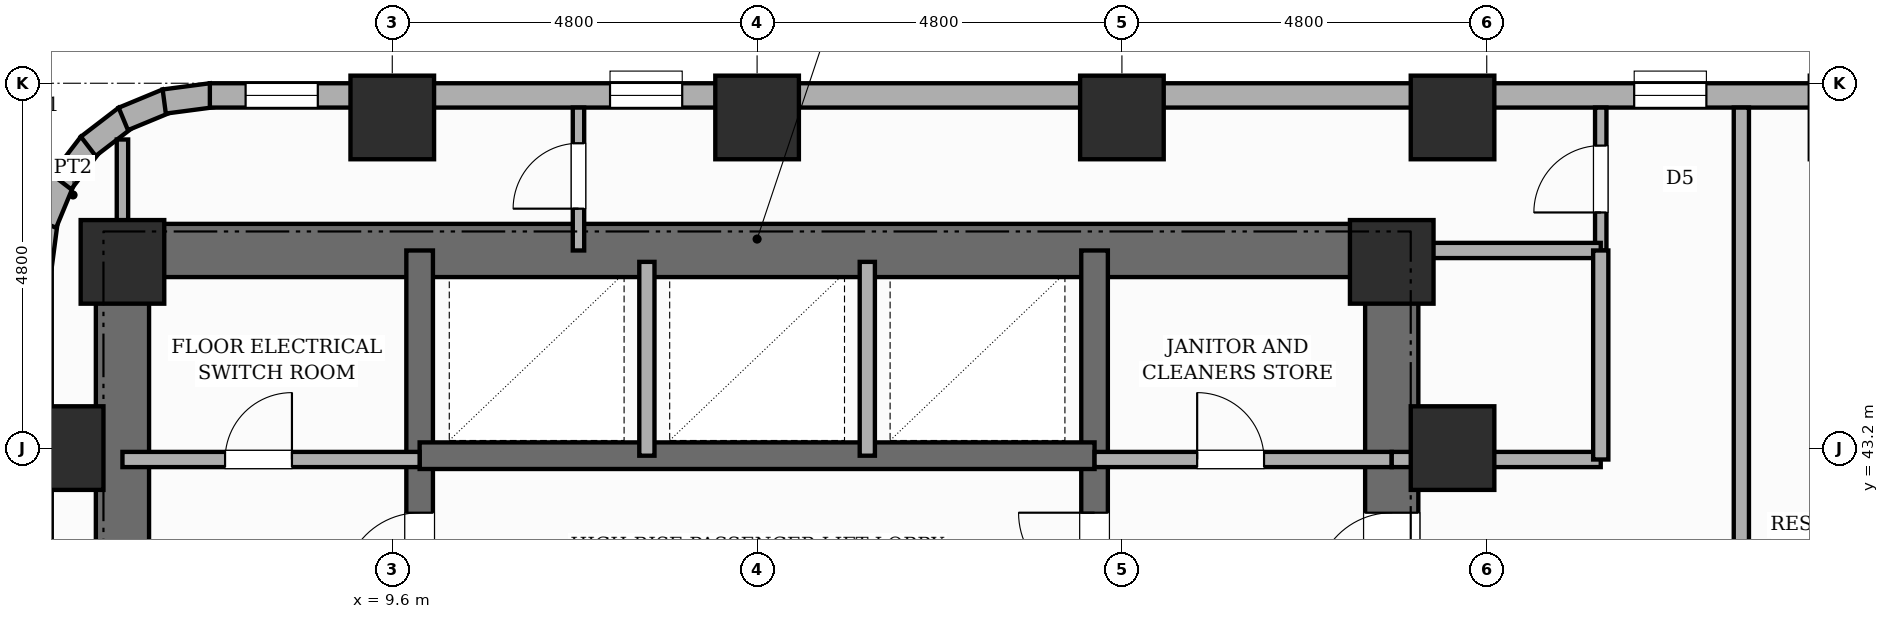
"""IFC4 building model, lengths in metres.
Left out: names, types, materials, properties, quantities, classifications, styles, units other than length and angle.
Written with IfcOpenShell. Run it as: python <this file> out.ifc"""

import sys

from ifc_helpers import new_model, si_unit, direction, frame, frame_2d, origin, origin_2d, place, context, subcontext, project, spatial, rectangle, extrude, element, fill, save


model = new_model("IFC4")
c1 = context("Model", 3, precision=1e-05, world=origin(), true_north=direction((0.0, 1.0)))
c2 = subcontext(c1, "Body", "Model", "MODEL_VIEW")
j1 = project(units=[si_unit("LENGTHUNIT", "METRE"), si_unit("PLANEANGLEUNIT", "RADIAN")], contexts=[c1])
p1 = place(None, origin())
s1 = spatial("IfcSite", under=j1, at=p1, CompositionType="ELEMENT")
p2 = place(p1, origin())
s2 = spatial("IfcBuilding", under=s1, at=p2, CompositionType="ELEMENT")
p3 = place(p2, frame((0.0, 0.0, 35.8)))
s3 = spatial("IfcBuildingStorey", under=s2, at=p3, CompositionType="ELEMENT", Elevation=35.8)
p4 = place(p3, frame((6.05, 30.55, 0.0), z_axis=(0.0, 0.0, 1.0), x_axis=(0.0, 1.0, 0.0)))
e1 = element("IfcWall", 1, at=p4, inside=s3, PredefinedType="SHEAR", context=c2, shape_type="SweptSolid", body=[
    extrude(rectangle(XDim=15.6, YDim=0.7, at=frame_2d((7.8, 0.0))), origin(), (0.0, 0.0, 1.0), 3.6),
])
p5 = place(p3, frame((22.75, 30.55, 0.0), z_axis=(0.0, 0.0, 1.0), x_axis=(0.0, 1.0, 0.0)))
e2 = element("IfcWall", 2, at=p5, inside=s3, PredefinedType="SHEAR", context=c2, shape_type="SweptSolid", body=[
    extrude(rectangle(XDim=15.6, YDim=0.7, at=frame_2d((7.8, 0.0))), origin(), (0.0, 0.0, 1.0), 3.6),
])
p6 = place(p5, frame((10.8, 0.0, 0.0)))
e3 = element("IfcOpeningElement", 3, at=p6, cuts=e2, PredefinedType="OPENING", context=c2, shape_type="SweptSolid", body=[
    extrude(rectangle(XDim=1.0, YDim=2.15, at=frame_2d((0.5, 1.075))), frame((0.0, 0.36, 0.0), z_axis=(0.0, -1.0, 0.0), x_axis=(1.0, 0.0, 0.0)), (0.0, 0.0, 1.0), 0.72),
])
p7 = place(p3, frame((6.05, 45.8, 0.0), z_axis=(0.0, 0.0, 1.0), x_axis=(1.0, 0.0, 0.0)))
e4 = element("IfcWall", 4, at=p7, inside=s3, PredefinedType="SHEAR", context=c2, shape_type="SweptSolid", body=[
    extrude(rectangle(XDim=16.7, YDim=0.7, at=frame_2d((8.35, 0.0))), origin(), (0.0, 0.0, 1.0), 3.6),
])
p8 = place(p3, frame((9.96, 30.9, 0.0), z_axis=(0.0, 0.0, 1.0), x_axis=(0.0, 1.0, 0.0)))
e5 = element("IfcWall", 5, at=p8, inside=s3, PredefinedType="SHEAR", context=c2, shape_type="SweptSolid", body=[
    extrude(rectangle(XDim=14.9, YDim=0.35, at=frame_2d((7.45, 0.0))), origin(), (0.0, 0.0, 1.0), 3.6),
])
p9 = place(p8, frame((0.65, 0.0, 0.0)))
e6 = element("IfcOpeningElement", 6, at=p9, cuts=e5, PredefinedType="OPENING", context=c2, shape_type="SweptSolid", body=[
    extrude(rectangle(XDim=0.95, YDim=2.1, at=frame_2d((0.475, 1.05))), frame((0.0, 0.185, 0.0), z_axis=(0.0, -1.0, 0.0), x_axis=(1.0, 0.0, 0.0)), (0.0, 0.0, 1.0), 0.37),
])
p10 = place(p8, frame((10.45, 0.0, 0.0)))
e7 = element("IfcOpeningElement", 7, at=p10, cuts=e5, PredefinedType="OPENING", context=c2, shape_type="SweptSolid", body=[
    extrude(rectangle(XDim=1.0, YDim=2.15, at=frame_2d((0.5, 1.075))), frame((0.0, 0.185, 0.0), z_axis=(0.0, -1.0, 0.0), x_axis=(1.0, 0.0, 0.0)), (0.0, 0.0, 1.0), 0.37),
])
p11 = place(p3, frame((18.84, 30.9, 0.0), z_axis=(0.0, 0.0, 1.0), x_axis=(0.0, 1.0, 0.0)))
e8 = element("IfcWall", 8, at=p11, inside=s3, PredefinedType="SHEAR", context=c2, shape_type="SweptSolid", body=[
    extrude(rectangle(XDim=14.9, YDim=0.35, at=frame_2d((7.45, 0.0))), origin(), (0.0, 0.0, 1.0), 3.6),
])
p12 = place(p11, frame((0.65, 0.0, 0.0)))
e9 = element("IfcOpeningElement", 9, at=p12, cuts=e8, PredefinedType="OPENING", context=c2, shape_type="SweptSolid", body=[
    extrude(rectangle(XDim=0.95, YDim=2.1, at=frame_2d((0.475, 1.05))), frame((0.0, 0.185, 0.0), z_axis=(0.0, -1.0, 0.0), x_axis=(1.0, 0.0, 0.0)), (0.0, 0.0, 1.0), 0.37),
])
p13 = place(p11, frame((10.45, 0.0, 0.0)))
e10 = element("IfcOpeningElement", 10, at=p13, cuts=e8, PredefinedType="OPENING", context=c2, shape_type="SweptSolid", body=[
    extrude(rectangle(XDim=1.0, YDim=2.15, at=frame_2d((0.5, 1.075))), frame((0.0, 0.185, 0.0), z_axis=(0.0, -1.0, 0.0), x_axis=(1.0, 0.0, 0.0)), (0.0, 0.0, 1.0), 0.37),
])
p14 = place(p3, frame((9.96, 43.1, 0.0), z_axis=(0.0, 0.0, 1.0), x_axis=(1.0, 0.0, 0.0)))
e11 = element("IfcWall", 11, at=p14, inside=s3, PredefinedType="SHEAR", context=c2, shape_type="SweptSolid", body=[
    extrude(rectangle(XDim=8.88, YDim=0.35, at=frame_2d((4.44, 0.0))), origin(), (0.0, 0.0, 1.0), 3.6),
])
for number, where, z_axis, x_axis in (
    (12, (5.25, 43.2, 0.0), (0.0, 0.0, 1.0), (1.0, 0.0, 0.0)),
    (13, (6.05, 45.65, 0.0), (0.0, 0.0, 1.0), (1.0, 0.0, 0.0)),
    (14, (9.6, 47.55, 0.0), (0.0, 0.0, 1.0), (1.0, 0.0, 0.0)),
    (15, (14.4, 47.55, 0.0), (0.0, 0.0, 1.0), (1.0, 0.0, 0.0)),
    (16, (19.2, 47.55, 0.0), (0.0, 0.0, 1.0), (1.0, 0.0, 0.0)),
    (17, (22.75, 45.65, 0.0), (0.0, 0.0, 1.0), (1.0, 0.0, 0.0)),
    (18, (23.55, 43.2, 0.0), (0.0, 0.0, 1.0), (1.0, 0.0, 0.0)),
    (19, (23.55, 47.55, 0.0), (0.0, 0.0, 1.0), (1.0, 0.0, 0.0)),
):
    element("IfcColumn", number, at=place(p3, frame(where, z_axis=z_axis, x_axis=x_axis)), inside=s3, PredefinedType="COLUMN", context=c2, shape_type="SweptSolid", body=[
        extrude(rectangle(XDim=1.1, YDim=1.1, at=origin_2d()), origin(), (0.0, 0.0, 1.0), 3.6),
    ])
for number, where, z_axis, x_axis in (
    (20, (4.958, 45.579, 0.0), (0.0, 0.0, 1.0), (0.131, 0.991, 0.0)),
    (21, (5.03, 46.16, 0.0), (0.0, 0.0, 1.0), (0.383, 0.924, 0.0)),
):
    element("IfcWall", number, at=place(p3, frame(where, z_axis=z_axis, x_axis=x_axis)), inside=s3, PredefinedType="STANDARD", context=c2, shape_type="SweptSolid", body=[
        extrude(rectangle(XDim=0.626, YDim=0.32, at=frame_2d((0.313, 0.0))), origin(), (0.0, 0.0, 1.0), 3.35),
    ])
p15 = place(p3, frame((5.248, 46.703, 0.0), z_axis=(0.0, 0.0, 1.0), x_axis=(0.608938521285, 0.7932174212, 0.0)))
e22 = element("IfcWall", 22, at=p15, inside=s3, PredefinedType="STANDARD", context=c2, shape_type="SweptSolid", body=[
    extrude(rectangle(XDim=0.627, YDim=0.32, at=frame_2d((0.313, 0.0))), origin(), (0.0, 0.0, 1.0), 3.35),
])
p16 = place(p3, frame((5.6, 47.17, 0.0), z_axis=(0.0, 0.0, 1.0), x_axis=(0.793405610854, 0.608693302629, 0.0)))
e23 = element("IfcWall", 23, at=p16, inside=s3, PredefinedType="STANDARD", context=c2, shape_type="SweptSolid", body=[
    extrude(rectangle(XDim=0.626, YDim=0.32, at=frame_2d((0.313, 0.0))), origin(), (0.0, 0.0, 1.0), 3.35),
])
p17 = place(p3, frame((6.061, 47.531, 0.0), z_axis=(0.0, 0.0, 1.0), x_axis=(0.923836271867, 0.382787856107, 0.0)))
e24 = element("IfcWall", 24, at=p17, inside=s3, PredefinedType="STANDARD", context=c2, shape_type="SweptSolid", body=[
    extrude(rectangle(XDim=0.626, YDim=0.32, at=frame_2d((0.313, 0.0))), origin(), (0.0, 0.0, 1.0), 3.35),
])
p18 = place(p3, frame((6.6, 47.76, 0.0), z_axis=(0.0, 0.0, 1.0), x_axis=(0.991447664465, 0.130504898859, 0.0)))
e25 = element("IfcWall", 25, at=p18, inside=s3, PredefinedType="STANDARD", context=c2, shape_type="SweptSolid", body=[
    extrude(rectangle(XDim=0.627, YDim=0.32, at=frame_2d((0.313, 0.0))), origin(), (0.0, 0.0, 1.0), 3.35),
])
p19 = place(p3, frame((7.2, 47.84, 0.0), z_axis=(0.0, 0.0, 1.0), x_axis=(1.0, 0.0, 0.0)))
e26 = element("IfcWall", 26, at=p19, inside=s3, PredefinedType="STANDARD", context=c2, shape_type="SweptSolid", body=[
    extrude(rectangle(XDim=48.0, YDim=0.32, at=frame_2d((24.0, 0.0))), origin(), (0.0, 0.0, 1.0), 2.53),
])
p20 = place(p19, frame((28.803, 0.0, 0.65)))
e27 = element("IfcOpeningElement", 27, at=p20, cuts=e26, PredefinedType="OPENING", context=c2, shape_type="SweptSolid", body=[
    extrude(rectangle(XDim=1.4, YDim=1.1, at=frame_2d((0.7, 0.55))), frame((0.0, 0.17, 0.0), z_axis=(0.0, -1.0, 0.0), x_axis=(1.0, 0.0, 0.0)), (0.0, 0.0, 1.0), 0.34),
])
p21 = place(p19, frame((43.414, 0.0, 0.45)))
e28 = element("IfcOpeningElement", 28, at=p21, cuts=e26, PredefinedType="OPENING", context=c2, shape_type="SweptSolid", body=[
    extrude(rectangle(XDim=0.95, YDim=1.8, at=frame_2d((0.475, 0.9))), frame((0.0, 0.17, 0.0), z_axis=(0.0, -1.0, 0.0), x_axis=(1.0, 0.0, 0.0)), (0.0, 0.0, 1.0), 0.34),
])
p22 = place(p19, frame((18.74, 0.0, 0.45)))
e29 = element("IfcOpeningElement", 29, at=p22, cuts=e26, PredefinedType="OPENING", context=c2, shape_type="SweptSolid", body=[
    extrude(rectangle(XDim=0.95, YDim=1.8, at=frame_2d((0.475, 0.9))), frame((0.0, 0.17, 0.0), z_axis=(0.0, -1.0, 0.0), x_axis=(1.0, 0.0, 0.0)), (0.0, 0.0, 1.0), 0.34),
])
p23 = place(p19, frame((37.825, 0.0, 0.65)))
e30 = element("IfcOpeningElement", 30, at=p23, cuts=e26, PredefinedType="OPENING", context=c2, shape_type="SweptSolid", body=[
    extrude(rectangle(XDim=1.4, YDim=1.1, at=frame_2d((0.7, 0.55))), frame((0.0, 0.17, 0.0), z_axis=(0.0, -1.0, 0.0), x_axis=(1.0, 0.0, 0.0)), (0.0, 0.0, 1.0), 0.34),
])
p24 = place(p19, frame((0.47, 0.0, 0.45)))
e31 = element("IfcOpeningElement", 31, at=p24, cuts=e26, PredefinedType="OPENING", context=c2, shape_type="SweptSolid", body=[
    extrude(rectangle(XDim=0.95, YDim=1.8, at=frame_2d((0.475, 0.9))), frame((0.0, 0.17, 0.0), z_axis=(0.0, -1.0, 0.0), x_axis=(1.0, 0.0, 0.0)), (0.0, 0.0, 1.0), 0.34),
])
p25 = place(p19, frame((5.265, 0.0, 0.45)))
e32 = element("IfcOpeningElement", 32, at=p25, cuts=e26, PredefinedType="OPENING", context=c2, shape_type="SweptSolid", body=[
    extrude(rectangle(XDim=0.95, YDim=1.8, at=frame_2d((0.475, 0.9))), frame((0.0, 0.17, 0.0), z_axis=(0.0, -1.0, 0.0), x_axis=(1.0, 0.0, 0.0)), (0.0, 0.0, 1.0), 0.34),
])
p26 = place(p19, frame((23.43, 0.0, 0.65)))
e33 = element("IfcOpeningElement", 33, at=p26, cuts=e26, PredefinedType="OPENING", context=c2, shape_type="SweptSolid", body=[
    extrude(rectangle(XDim=1.4, YDim=1.1, at=frame_2d((0.7, 0.55))), frame((0.0, 0.17, 0.0), z_axis=(0.0, -1.0, 0.0), x_axis=(1.0, 0.0, 0.0)), (0.0, 0.0, 1.0), 0.34),
])
p27 = place(p19, frame((41.809, 0.0, 0.45)))
e34 = element("IfcOpeningElement", 34, at=p27, cuts=e26, PredefinedType="OPENING", context=c2, shape_type="SweptSolid", body=[
    extrude(rectangle(XDim=0.95, YDim=1.8, at=frame_2d((0.475, 0.9))), frame((0.0, 0.17, 0.0), z_axis=(0.0, -1.0, 0.0), x_axis=(1.0, 0.0, 0.0)), (0.0, 0.0, 1.0), 0.34),
])
p28 = place(p3, frame((18.84, 43.05, 0.0), z_axis=(0.0, 0.0, 1.0), x_axis=(1.0, 0.0, 0.0)))
e35 = element("IfcWall", 35, at=p28, inside=s3, PredefinedType="POLYGONAL", context=c2, shape_type="SweptSolid", body=[
    extrude(rectangle(XDim=3.91, YDim=0.2, at=frame_2d((1.955, 0.0))), origin(), (0.0, 0.0, 1.0), 2.53),
])
p29 = place(p28, frame((1.35, 0.0, 0.0)))
e36 = element("IfcOpeningElement", 36, at=p29, cuts=e35, PredefinedType="OPENING", context=c2, shape_type="SweptSolid", body=[
    extrude(rectangle(XDim=0.88, YDim=2.1, at=frame_2d((0.44, 1.05))), frame((0.0, 0.11, 0.0), z_axis=(0.0, -1.0, 0.0), x_axis=(1.0, 0.0, 0.0)), (0.0, 0.0, 1.0), 0.22),
])
p30 = place(p3, frame((6.05, 43.05, 0.0), z_axis=(0.0, 0.0, 1.0), x_axis=(1.0, 0.0, 0.0)))
e37 = element("IfcWall", 37, at=p30, inside=s3, PredefinedType="POLYGONAL", context=c2, shape_type="SweptSolid", body=[
    extrude(rectangle(XDim=3.91, YDim=0.2, at=frame_2d((1.955, 0.0))), origin(), (0.0, 0.0, 1.0), 2.53),
])
p31 = place(p30, frame((1.35, 0.0, 0.0)))
e38 = element("IfcOpeningElement", 38, at=p31, cuts=e37, PredefinedType="OPENING", context=c2, shape_type="SweptSolid", body=[
    extrude(rectangle(XDim=0.88, YDim=2.1, at=frame_2d((0.44, 1.05))), frame((0.0, 0.11, 0.0), z_axis=(0.0, -1.0, 0.0), x_axis=(1.0, 0.0, 0.0)), (0.0, 0.0, 1.0), 0.22),
])
for number, where, z_axis, x_axis in (
    (39, (12.95, 43.1, 0.0), (0.0, 0.0, 1.0), (0.0, 1.0, 0.0)),
    (40, (15.85, 43.1, 0.0), (0.0, 0.0, 1.0), (0.0, 1.0, 0.0)),
):
    element("IfcWall", number, at=place(p3, frame(where, z_axis=z_axis, x_axis=x_axis)), inside=s3, PredefinedType="POLYGONAL", context=c2, shape_type="SweptSolid", body=[
        extrude(rectangle(XDim=2.55, YDim=0.2, at=frame_2d((1.275, 0.0))), origin(), (0.0, 0.0, 1.0), 3.35),
    ])
p32 = place(p3, frame((25.5, 45.8, 0.0), z_axis=(0.0, 0.0, 1.0), x_axis=(0.0, 1.0, 0.0)))
e41 = element("IfcWall", 41, at=p32, inside=s3, PredefinedType="PARTITIONING", context=c2, shape_type="SweptSolid", body=[
    extrude(rectangle(XDim=1.88, YDim=0.15, at=frame_2d((0.94, 0.0))), origin(), (0.0, 0.0, 1.0), 3.35),
])
p33 = place(p32, frame((0.5, 0.0, 0.0)))
e42 = element("IfcOpeningElement", 42, at=p33, cuts=e41, PredefinedType="OPENING", context=c2, shape_type="SweptSolid", body=[
    extrude(rectangle(XDim=0.88, YDim=2.1, at=frame_2d((0.44, 1.05))), frame((0.0, 0.085, 0.0), z_axis=(0.0, -1.0, 0.0), x_axis=(1.0, 0.0, 0.0)), (0.0, 0.0, 1.0), 0.17),
])
p34 = place(p3, frame((22.75, 45.8, 0.0), z_axis=(0.0, 0.0, 1.0), x_axis=(1.0, 0.0, 0.0)))
e43 = element("IfcWall", 43, at=p34, inside=s3, PredefinedType="PARTITIONING", context=c2, shape_type="SweptSolid", body=[
    extrude(rectangle(XDim=2.75, YDim=0.2, at=frame_2d((1.375, 0.0))), origin(), (0.0, 0.0, 1.0), 3.35),
])
p35 = place(p3, frame((6.05, 45.8, 0.0), z_axis=(0.0, 0.0, 1.0), x_axis=(0.0, 1.0, 0.0)))
e44 = element("IfcWall", 44, at=p35, inside=s3, PredefinedType="PARTITIONING", context=c2, shape_type="SweptSolid", body=[
    extrude(rectangle(XDim=1.46, YDim=0.15, at=frame_2d((0.73, 0.0))), origin(), (0.0, 0.0, 1.0), 3.35),
])
p36 = place(p3, frame((12.05, 45.8, 0.0), z_axis=(0.0, 0.0, 1.0), x_axis=(0.0, 1.0, 0.0)))
e45 = element("IfcWall", 45, at=p36, inside=s3, PredefinedType="PARTITIONING", context=c2, shape_type="SweptSolid", body=[
    extrude(rectangle(XDim=1.88, YDim=0.15, at=frame_2d((0.94, 0.0))), origin(), (0.0, 0.0, 1.0), 3.35),
])
p37 = place(p36, frame((0.55, 0.0, 0.0)))
e46 = element("IfcOpeningElement", 46, at=p37, cuts=e45, PredefinedType="OPENING", context=c2, shape_type="SweptSolid", body=[
    extrude(rectangle(XDim=0.86, YDim=2.1, at=frame_2d((0.43, 1.05))), frame((0.0, 0.085, 0.0), z_axis=(0.0, -1.0, 0.0), x_axis=(1.0, 0.0, 0.0)), (0.0, 0.0, 1.0), 0.17),
])
p38 = place(p3, frame((27.35, 35.85, 0.0), z_axis=(0.0, 0.0, 1.0), x_axis=(0.0, 1.0, 0.0)))
e47 = element("IfcWall", 47, at=p38, inside=s3, PredefinedType="PARTITIONING", context=c2, shape_type="SweptSolid", body=[
    extrude(rectangle(XDim=11.83, YDim=0.2, at=frame_2d((5.915, 0.0))), origin(), (0.0, 0.0, 1.0), 3.35),
])
p39 = place(p38, frame((1.2, 0.0, 0.0)))
e48 = element("IfcOpeningElement", 48, at=p39, cuts=e47, PredefinedType="OPENING", context=c2, shape_type="SweptSolid", body=[
    extrude(rectangle(XDim=0.95, YDim=2.15, at=frame_2d((0.475, 1.075))), frame((0.0, 0.11, 0.0), z_axis=(0.0, -1.0, 0.0), x_axis=(1.0, 0.0, 0.0)), (0.0, 0.0, 1.0), 0.22),
])
p40 = place(p3, frame((22.75, 43.05, 0.0), z_axis=(0.0, 0.0, 1.0), x_axis=(1.0, 0.0, 0.0)))
e49 = element("IfcWall", 49, at=p40, inside=s3, PredefinedType="PARTITIONING", context=c2, shape_type="SweptSolid", body=[
    extrude(rectangle(XDim=2.75, YDim=0.2, at=frame_2d((1.375, 0.0))), origin(), (0.0, 0.0, 1.0), 2.53),
])
p41 = place(p3, frame((25.5, 43.05, 0.0), z_axis=(0.0, 0.0, 1.0), x_axis=(0.0, 1.0, 0.0)))
e50 = element("IfcWall", 50, at=p41, inside=s3, PredefinedType="PARTITIONING", context=c2, shape_type="SweptSolid", body=[
    extrude(rectangle(XDim=2.75, YDim=0.2, at=frame_2d((1.375, 0.0))), origin(), (0.0, 0.0, 1.0), 3.35),
])
p42 = place(p22, origin())
e51 = element("IfcWindow", 51, at=p42, inside=s3, PartitioningType="SINGLE_PANEL", PredefinedType="WINDOW", context=c2, shape_type="SweptSolid", body=[
    extrude(rectangle(XDim=0.95, YDim=1.8, at=frame_2d((0.475, 0.9))), frame((0.0, 0.03, 0.0), z_axis=(0.0, -1.0, 0.0), x_axis=(1.0, 0.0, 0.0)), (0.0, 0.0, 1.0), 0.06),
])
fill(e29, e51)
p43 = place(p24, origin())
e52 = element("IfcWindow", 52, at=p43, inside=s3, PartitioningType="SINGLE_PANEL", PredefinedType="WINDOW", context=c2, shape_type="SweptSolid", body=[
    extrude(rectangle(XDim=0.95, YDim=1.8, at=frame_2d((0.475, 0.9))), frame((0.0, 0.03, 0.0), z_axis=(0.0, -1.0, 0.0), x_axis=(1.0, 0.0, 0.0)), (0.0, 0.0, 1.0), 0.06),
])
fill(e31, e52)
p44 = place(p25, origin())
e53 = element("IfcWindow", 53, at=p44, inside=s3, PartitioningType="SINGLE_PANEL", PredefinedType="WINDOW", context=c2, shape_type="SweptSolid", body=[
    extrude(rectangle(XDim=0.95, YDim=1.8, at=frame_2d((0.475, 0.9))), frame((0.0, 0.03, 0.0), z_axis=(0.0, -1.0, 0.0), x_axis=(1.0, 0.0, 0.0)), (0.0, 0.0, 1.0), 0.06),
])
fill(e32, e53)
p45 = place(p10, origin())
e54 = element("IfcDoor", 54, at=p45, inside=s3, OperationType="SINGLE_SWING_LEFT", PredefinedType="DOOR", context=c2, shape_type="SweptSolid", body=[
    extrude(rectangle(XDim=1.0, YDim=2.15, at=frame_2d((0.5, 1.075))), frame((0.0, 0.025, 0.0), z_axis=(0.0, -1.0, 0.0), x_axis=(1.0, 0.0, 0.0)), (0.0, 0.0, 1.0), 0.05),
])
fill(e7, e54)
p46 = place(p13, origin())
e55 = element("IfcDoor", 55, at=p46, inside=s3, OperationType="SINGLE_SWING_RIGHT", PredefinedType="DOOR", context=c2, shape_type="SweptSolid", body=[
    extrude(rectangle(XDim=1.0, YDim=2.15, at=frame_2d((0.5, 1.075))), frame((0.0, 0.025, 0.0), z_axis=(0.0, -1.0, 0.0), x_axis=(1.0, 0.0, 0.0)), (0.0, 0.0, 1.0), 0.05),
])
fill(e10, e55)
p47 = place(p6, origin())
e56 = element("IfcDoor", 56, at=p47, inside=s3, OperationType="SINGLE_SWING_LEFT", PredefinedType="DOOR", context=c2, shape_type="SweptSolid", body=[
    extrude(rectangle(XDim=1.0, YDim=2.15, at=frame_2d((0.5, 1.075))), frame((0.0, 0.025, 0.0), z_axis=(0.0, -1.0, 0.0), x_axis=(1.0, 0.0, 0.0)), (0.0, 0.0, 1.0), 0.05),
])
fill(e3, e56)
p48 = place(p31, origin())
e57 = element("IfcDoor", 57, at=p48, inside=s3, OperationType="SINGLE_SWING_RIGHT", PredefinedType="DOOR", context=c2, shape_type="SweptSolid", body=[
    extrude(rectangle(XDim=0.88, YDim=2.1, at=frame_2d((0.44, 1.05))), frame((0.0, 0.025, 0.0), z_axis=(0.0, -1.0, 0.0), x_axis=(1.0, 0.0, 0.0)), (0.0, 0.0, 1.0), 0.05),
])
fill(e38, e57)
p49 = place(p29, origin())
e58 = element("IfcDoor", 58, at=p49, inside=s3, OperationType="SINGLE_SWING_LEFT", PredefinedType="DOOR", context=c2, shape_type="SweptSolid", body=[
    extrude(rectangle(XDim=0.88, YDim=2.1, at=frame_2d((0.44, 1.05))), frame((0.0, 0.025, 0.0), z_axis=(0.0, -1.0, 0.0), x_axis=(1.0, 0.0, 0.0)), (0.0, 0.0, 1.0), 0.05),
])
fill(e36, e58)
p50 = place(p33, origin())
e59 = element("IfcDoor", 59, at=p50, inside=s3, OperationType="SINGLE_SWING_LEFT", PredefinedType="DOOR", context=c2, shape_type="SweptSolid", body=[
    extrude(rectangle(XDim=0.88, YDim=2.1, at=frame_2d((0.44, 1.05))), frame((0.0, 0.025, 0.0), z_axis=(0.0, -1.0, 0.0), x_axis=(1.0, 0.0, 0.0)), (0.0, 0.0, 1.0), 0.05),
])
fill(e42, e59)
p51 = place(p37, origin())
e60 = element("IfcDoor", 60, at=p51, inside=s3, OperationType="SINGLE_SWING_LEFT", PredefinedType="DOOR", context=c2, shape_type="SweptSolid", body=[
    extrude(rectangle(XDim=0.86, YDim=2.1, at=frame_2d((0.43, 1.05))), frame((0.0, 0.025, 0.0), z_axis=(0.0, -1.0, 0.0), x_axis=(1.0, 0.0, 0.0)), (0.0, 0.0, 1.0), 0.05),
])
fill(e46, e60)
save(model, sys.argv[1])
